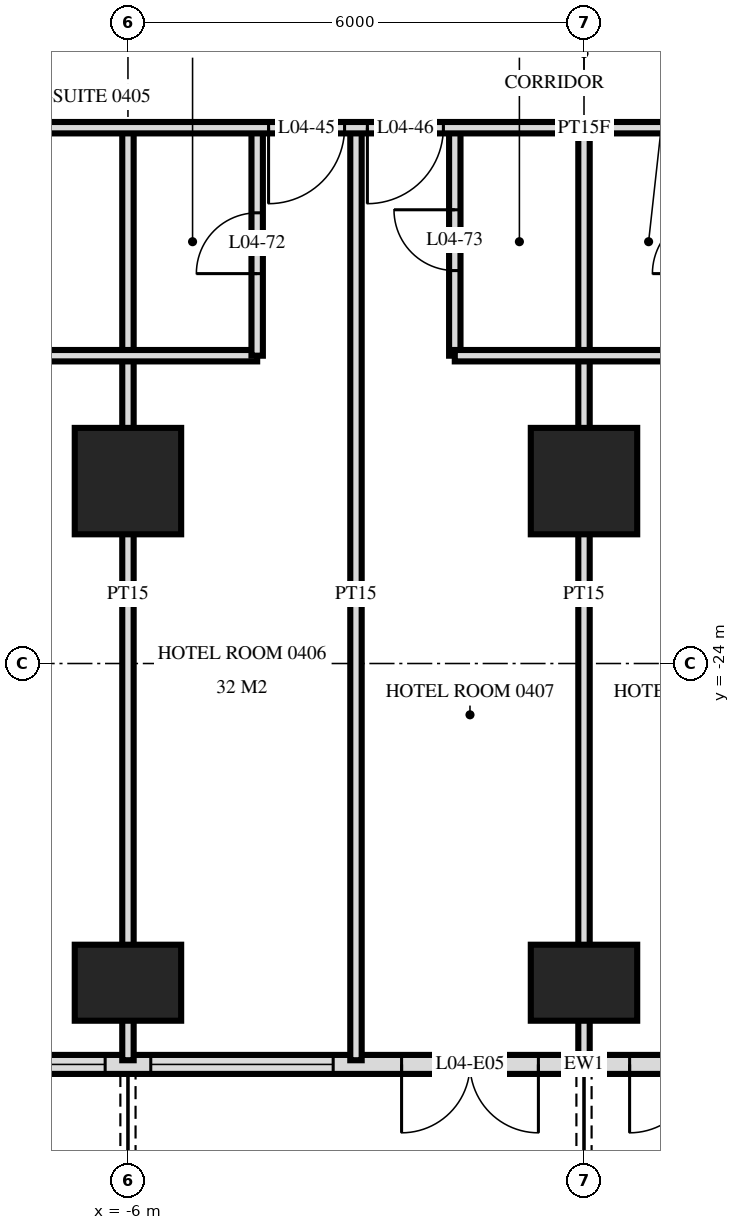
"""IFC4 building model, lengths in metres.
Left out: names, types, materials, properties, quantities, classifications, styles, units other than length and angle.
Written with IfcOpenShell. Run it as: python <this file> out.ifc"""

import sys

from ifc_helpers import new_model, si_unit, direction, frame, frame_2d, origin, origin_2d, place, context, subcontext, project, spatial, rectangle, extrude, element, fill, save


model = new_model("IFC4")
c1 = context("Model", 3, precision=1e-05, world=origin(), true_north=direction((0.0, 1.0)))
c2 = subcontext(c1, "Body", "Model", "MODEL_VIEW")
j1 = project(units=[si_unit("LENGTHUNIT", "METRE"), si_unit("PLANEANGLEUNIT", "RADIAN")], contexts=[c1])
p1 = place(None, origin())
s1 = spatial("IfcSite", under=j1, at=p1, CompositionType="ELEMENT")
p2 = place(p1, origin())
s2 = spatial("IfcBuilding", under=s1, at=p2, CompositionType="ELEMENT")
p3 = place(p2, frame((0.0, 0.0, 24.0)))
s3 = spatial("IfcBuildingStorey", under=s2, at=p3, CompositionType="ELEMENT", Elevation=24.0)
p4 = place(p3, frame((-6.0, -28.2, -0.28), z_axis=(0.0, 0.0, 1.0), x_axis=(1.0, 0.0, 0.0)))
e1 = element("IfcColumn", 1, at=p4, inside=s3, PredefinedType="COLUMN", context=c2, shape_type="SweptSolid", body=[
    extrude(rectangle(XDim=1.4, YDim=1.0, at=origin_2d()), origin(), (0.0, 0.0, 1.0), 3.88),
])
p5 = place(p3, frame((-6.0, -21.6, -0.28), z_axis=(0.0, 0.0, 1.0), x_axis=(1.0, 0.0, 0.0)))
e2 = element("IfcColumn", 2, at=p5, inside=s3, PredefinedType="COLUMN", context=c2, shape_type="SweptSolid", body=[
    extrude(rectangle(XDim=1.4, YDim=1.4, at=origin_2d()), origin(), (0.0, 0.0, 1.0), 3.88),
])
p6 = place(p3, frame((0.0, -28.2, -0.28), z_axis=(0.0, 0.0, 1.0), x_axis=(1.0, 0.0, 0.0)))
e3 = element("IfcColumn", 3, at=p6, inside=s3, PredefinedType="COLUMN", context=c2, shape_type="SweptSolid", body=[
    extrude(rectangle(XDim=1.4, YDim=1.0, at=origin_2d()), origin(), (0.0, 0.0, 1.0), 3.88),
])
p7 = place(p3, frame((0.0, -21.6, -0.28), z_axis=(0.0, 0.0, 1.0), x_axis=(1.0, 0.0, 0.0)))
e4 = element("IfcColumn", 4, at=p7, inside=s3, PredefinedType="COLUMN", context=c2, shape_type="SweptSolid", body=[
    extrude(rectangle(XDim=1.4, YDim=1.4, at=origin_2d()), origin(), (0.0, 0.0, 1.0), 3.88),
])
p8 = place(p3, frame((-28.775, -29.275, 0.0), z_axis=(0.0, 0.0, 1.0), x_axis=(1.0, 0.0, 0.0)))
e5 = element("IfcWall", 5, at=p8, inside=s3, PredefinedType="SOLIDWALL", context=c2, shape_type="SweptSolid", body=[
    extrude(rectangle(XDim=57.551, YDim=0.25, at=frame_2d((28.775, 0.0))), origin(), (0.0, 0.0, 1.0), 3.32),
])
p9 = place(p8, frame((0.575, 0.0, 0.0)))
e6 = element("IfcOpeningElement", 6, at=p9, cuts=e5, PredefinedType="OPENING", context=c2, shape_type="SweptSolid", body=[
    extrude(rectangle(XDim=1.8, YDim=2.4, at=frame_2d((0.9, 1.2))), frame((0.0, 0.135, 0.0), z_axis=(0.0, -1.0, 0.0), x_axis=(1.0, 0.0, 0.0)), (0.0, 0.0, 1.0), 0.27),
])
p10 = place(p8, frame((5.375, 0.0, 0.0)))
e7 = element("IfcOpeningElement", 7, at=p10, cuts=e5, PredefinedType="OPENING", context=c2, shape_type="SweptSolid", body=[
    extrude(rectangle(XDim=1.8, YDim=2.4, at=frame_2d((0.9, 1.2))), frame((0.0, 0.135, 0.0), z_axis=(0.0, -1.0, 0.0), x_axis=(1.0, 0.0, 0.0)), (0.0, 0.0, 1.0), 0.27),
])
p11 = place(p8, frame((8.075, 0.0, 0.3)))
e8 = element("IfcOpeningElement", 8, at=p11, cuts=e5, PredefinedType="OPENING", context=c2, shape_type="SweptSolid", body=[
    extrude(rectangle(XDim=2.4, YDim=2.1, at=frame_2d((1.2, 1.05))), frame((0.0, 0.135, 0.0), z_axis=(0.0, -1.0, 0.0), x_axis=(1.0, 0.0, 0.0)), (0.0, 0.0, 1.0), 0.27),
])
p12 = place(p8, frame((11.375, 0.0, 0.0)))
e9 = element("IfcOpeningElement", 9, at=p12, cuts=e5, PredefinedType="OPENING", context=c2, shape_type="SweptSolid", body=[
    extrude(rectangle(XDim=1.8, YDim=2.4, at=frame_2d((0.9, 1.2))), frame((0.0, 0.135, 0.0), z_axis=(0.0, -1.0, 0.0), x_axis=(1.0, 0.0, 0.0)), (0.0, 0.0, 1.0), 0.27),
])
p13 = place(p8, frame((14.075, 0.0, 0.3)))
e10 = element("IfcOpeningElement", 10, at=p13, cuts=e5, PredefinedType="OPENING", context=c2, shape_type="SweptSolid", body=[
    extrude(rectangle(XDim=2.4, YDim=2.1, at=frame_2d((1.2, 1.05))), frame((0.0, 0.135, 0.0), z_axis=(0.0, -1.0, 0.0), x_axis=(1.0, 0.0, 0.0)), (0.0, 0.0, 1.0), 0.27),
])
p14 = place(p8, frame((17.375, 0.0, 0.0)))
e11 = element("IfcOpeningElement", 11, at=p14, cuts=e5, PredefinedType="OPENING", context=c2, shape_type="SweptSolid", body=[
    extrude(rectangle(XDim=1.8, YDim=2.4, at=frame_2d((0.9, 1.2))), frame((0.0, 0.135, 0.0), z_axis=(0.0, -1.0, 0.0), x_axis=(1.0, 0.0, 0.0)), (0.0, 0.0, 1.0), 0.27),
])
p15 = place(p8, frame((20.075, 0.0, 0.3)))
e12 = element("IfcOpeningElement", 12, at=p15, cuts=e5, PredefinedType="OPENING", context=c2, shape_type="SweptSolid", body=[
    extrude(rectangle(XDim=2.4, YDim=2.1, at=frame_2d((1.2, 1.05))), frame((0.0, 0.135, 0.0), z_axis=(0.0, -1.0, 0.0), x_axis=(1.0, 0.0, 0.0)), (0.0, 0.0, 1.0), 0.27),
])
p16 = place(p8, frame((23.075, 0.0, 0.3)))
e13 = element("IfcOpeningElement", 13, at=p16, cuts=e5, PredefinedType="OPENING", context=c2, shape_type="SweptSolid", body=[
    extrude(rectangle(XDim=2.4, YDim=2.1, at=frame_2d((1.2, 1.05))), frame((0.0, 0.135, 0.0), z_axis=(0.0, -1.0, 0.0), x_axis=(1.0, 0.0, 0.0)), (0.0, 0.0, 1.0), 0.27),
])
p17 = place(p8, frame((26.375, 0.0, 0.0)))
e14 = element("IfcOpeningElement", 14, at=p17, cuts=e5, PredefinedType="OPENING", context=c2, shape_type="SweptSolid", body=[
    extrude(rectangle(XDim=1.8, YDim=2.4, at=frame_2d((0.9, 1.2))), frame((0.0, 0.135, 0.0), z_axis=(0.0, -1.0, 0.0), x_axis=(1.0, 0.0, 0.0)), (0.0, 0.0, 1.0), 0.27),
])
p18 = place(p8, frame((29.375, 0.0, 0.0)))
e15 = element("IfcOpeningElement", 15, at=p18, cuts=e5, PredefinedType="OPENING", context=c2, shape_type="SweptSolid", body=[
    extrude(rectangle(XDim=1.8, YDim=2.4, at=frame_2d((0.9, 1.2))), frame((0.0, 0.135, 0.0), z_axis=(0.0, -1.0, 0.0), x_axis=(1.0, 0.0, 0.0)), (0.0, 0.0, 1.0), 0.27),
])
p19 = place(p8, frame((32.075, 0.0, 0.3)))
e16 = element("IfcOpeningElement", 16, at=p19, cuts=e5, PredefinedType="OPENING", context=c2, shape_type="SweptSolid", body=[
    extrude(rectangle(XDim=2.4, YDim=2.1, at=frame_2d((1.2, 1.05))), frame((0.0, 0.135, 0.0), z_axis=(0.0, -1.0, 0.0), x_axis=(1.0, 0.0, 0.0)), (0.0, 0.0, 1.0), 0.27),
])
p20 = place(p8, frame((35.375, 0.0, 0.0)))
e17 = element("IfcOpeningElement", 17, at=p20, cuts=e5, PredefinedType="OPENING", context=c2, shape_type="SweptSolid", body=[
    extrude(rectangle(XDim=1.8, YDim=2.4, at=frame_2d((0.9, 1.2))), frame((0.0, 0.135, 0.0), z_axis=(0.0, -1.0, 0.0), x_axis=(1.0, 0.0, 0.0)), (0.0, 0.0, 1.0), 0.27),
])
p21 = place(p8, frame((38.075, 0.0, 0.3)))
e18 = element("IfcOpeningElement", 18, at=p21, cuts=e5, PredefinedType="OPENING", context=c2, shape_type="SweptSolid", body=[
    extrude(rectangle(XDim=2.4, YDim=2.1, at=frame_2d((1.2, 1.05))), frame((0.0, 0.135, 0.0), z_axis=(0.0, -1.0, 0.0), x_axis=(1.0, 0.0, 0.0)), (0.0, 0.0, 1.0), 0.27),
])
p22 = place(p8, frame((41.375, 0.0, 0.0)))
e19 = element("IfcOpeningElement", 19, at=p22, cuts=e5, PredefinedType="OPENING", context=c2, shape_type="SweptSolid", body=[
    extrude(rectangle(XDim=1.8, YDim=2.4, at=frame_2d((0.9, 1.2))), frame((0.0, 0.135, 0.0), z_axis=(0.0, -1.0, 0.0), x_axis=(1.0, 0.0, 0.0)), (0.0, 0.0, 1.0), 0.27),
])
p23 = place(p8, frame((44.075, 0.0, 0.3)))
e20 = element("IfcOpeningElement", 20, at=p23, cuts=e5, PredefinedType="OPENING", context=c2, shape_type="SweptSolid", body=[
    extrude(rectangle(XDim=2.4, YDim=2.1, at=frame_2d((1.2, 1.05))), frame((0.0, 0.135, 0.0), z_axis=(0.0, -1.0, 0.0), x_axis=(1.0, 0.0, 0.0)), (0.0, 0.0, 1.0), 0.27),
])
p24 = place(p8, frame((47.075, 0.0, 0.3)))
e21 = element("IfcOpeningElement", 21, at=p24, cuts=e5, PredefinedType="OPENING", context=c2, shape_type="SweptSolid", body=[
    extrude(rectangle(XDim=2.4, YDim=2.1, at=frame_2d((1.2, 1.05))), frame((0.0, 0.135, 0.0), z_axis=(0.0, -1.0, 0.0), x_axis=(1.0, 0.0, 0.0)), (0.0, 0.0, 1.0), 0.27),
])
p25 = place(p8, frame((50.375, 0.0, 0.0)))
e22 = element("IfcOpeningElement", 22, at=p25, cuts=e5, PredefinedType="OPENING", context=c2, shape_type="SweptSolid", body=[
    extrude(rectangle(XDim=1.8, YDim=2.4, at=frame_2d((0.9, 1.2))), frame((0.0, 0.135, 0.0), z_axis=(0.0, -1.0, 0.0), x_axis=(1.0, 0.0, 0.0)), (0.0, 0.0, 1.0), 0.27),
])
p26 = place(p8, frame((53.375, 0.0, 0.0)))
e23 = element("IfcOpeningElement", 23, at=p26, cuts=e5, PredefinedType="OPENING", context=c2, shape_type="SweptSolid", body=[
    extrude(rectangle(XDim=1.8, YDim=2.4, at=frame_2d((0.9, 1.2))), frame((0.0, 0.135, 0.0), z_axis=(0.0, -1.0, 0.0), x_axis=(1.0, 0.0, 0.0)), (0.0, 0.0, 1.0), 0.27),
])
p27 = place(p3, frame((0.0, -29.22, 0.0), z_axis=(0.0, 0.0, 1.0), x_axis=(0.0, 1.0, 0.0)))
e24 = element("IfcWall", 24, at=p27, inside=s3, PredefinedType="PARTITIONING", context=c2, shape_type="SweptSolid", body=[
    extrude(rectangle(XDim=12.27, YDim=0.15, at=frame_2d((6.135, 0.0))), origin(), (0.0, 0.0, 1.0), 3.32),
])
p28 = place(p3, frame((-1.7, -19.95, 0.0), z_axis=(0.0, 0.0, 1.0), x_axis=(0.0, 1.0, 0.0)))
e25 = element("IfcWall", 25, at=p28, inside=s3, PredefinedType="PARTITIONING", context=c2, shape_type="SweptSolid", body=[
    extrude(rectangle(XDim=3.0, YDim=0.15, at=frame_2d((1.5, 0.0))), origin(), (0.0, 0.0, 1.0), 3.32),
])
p29 = place(p28, frame((1.12, 0.0, 0.0)))
e26 = element("IfcOpeningElement", 26, at=p29, cuts=e25, PredefinedType="OPENING", context=c2, shape_type="SweptSolid", body=[
    extrude(rectangle(XDim=0.8, YDim=2.1, at=frame_2d((0.4, 1.05))), frame((0.0, 0.085, 0.0), z_axis=(0.0, -1.0, 0.0), x_axis=(1.0, 0.0, 0.0)), (0.0, 0.0, 1.0), 0.17),
])
p30 = place(p3, frame((-3.0, -29.22, 0.0), z_axis=(0.0, 0.0, 1.0), x_axis=(0.0, 1.0, 0.0)))
e27 = element("IfcWall", 27, at=p30, inside=s3, PredefinedType="PARTITIONING", context=c2, shape_type="SweptSolid", body=[
    extrude(rectangle(XDim=12.27, YDim=0.15, at=frame_2d((6.135, 0.0))), origin(), (0.0, 0.0, 1.0), 3.32),
])
p31 = place(p3, frame((-4.3, -19.95, 0.0), z_axis=(0.0, 0.0, 1.0), x_axis=(0.0, 1.0, 0.0)))
e28 = element("IfcWall", 28, at=p31, inside=s3, PredefinedType="PARTITIONING", context=c2, shape_type="SweptSolid", body=[
    extrude(rectangle(XDim=3.0, YDim=0.15, at=frame_2d((1.5, 0.0))), origin(), (0.0, 0.0, 1.0), 3.32),
])
p32 = place(p31, frame((1.08, 0.0, 0.0)))
e29 = element("IfcOpeningElement", 29, at=p32, cuts=e28, PredefinedType="OPENING", context=c2, shape_type="SweptSolid", body=[
    extrude(rectangle(XDim=0.8, YDim=2.1, at=frame_2d((0.4, 1.05))), frame((0.0, 0.085, 0.0), z_axis=(0.0, -1.0, 0.0), x_axis=(1.0, 0.0, 0.0)), (0.0, 0.0, 1.0), 0.17),
])
p33 = place(p3, frame((-6.0, -29.22, 0.0), z_axis=(0.0, 0.0, 1.0), x_axis=(0.0, 1.0, 0.0)))
e30 = element("IfcWall", 30, at=p33, inside=s3, PredefinedType="PARTITIONING", context=c2, shape_type="SweptSolid", body=[
    extrude(rectangle(XDim=12.27, YDim=0.15, at=frame_2d((6.135, 0.0))), origin(), (0.0, 0.0, 1.0), 3.32),
])
p34 = place(p3, frame((-8.7, -19.95, 0.0), z_axis=(0.0, 0.0, 1.0), x_axis=(1.0, 0.0, 0.0)))
e31 = element("IfcWall", 31, at=p34, inside=s3, PredefinedType="PARTITIONING", context=c2, shape_type="SweptSolid", body=[
    extrude(rectangle(XDim=4.4, YDim=0.15, at=frame_2d((2.2, 0.0))), origin(), (0.0, 0.0, 1.0), 3.32),
])
p35 = place(p3, frame((-1.7, -19.95, 0.0), z_axis=(0.0, 0.0, 1.0), x_axis=(1.0, 0.0, 0.0)))
e32 = element("IfcWall", 32, at=p35, inside=s3, PredefinedType="PARTITIONING", context=c2, shape_type="SweptSolid", body=[
    extrude(rectangle(XDim=3.4, YDim=0.15, at=frame_2d((1.7, 0.0))), origin(), (0.0, 0.0, 1.0), 3.32),
])
p36 = place(p3, frame((-33.12, -16.95, 0.0), z_axis=(0.0, 0.0, 1.0), x_axis=(1.0, 0.0, 0.0)))
e33 = element("IfcWall", 33, at=p36, inside=s3, PredefinedType="PARTITIONING", context=c2, shape_type="SweptSolid", body=[
    extrude(rectangle(XDim=66.24, YDim=0.15, at=frame_2d((33.12, 0.0))), origin(), (0.0, 0.0, 1.0), 3.32),
])
p37 = place(p36, frame((9.27, 0.0, 0.0)))
e34 = element("IfcOpeningElement", 34, at=p37, cuts=e33, PredefinedType="OPENING", context=c2, shape_type="SweptSolid", body=[
    extrude(rectangle(XDim=1.0, YDim=2.1, at=frame_2d((0.5, 1.05))), frame((0.0, 0.085, 0.0), z_axis=(0.0, -1.0, 0.0), x_axis=(1.0, 0.0, 0.0)), (0.0, 0.0, 1.0), 0.17),
])
p38 = place(p36, frame((13.97, 0.0, 0.0)))
e35 = element("IfcOpeningElement", 35, at=p38, cuts=e33, PredefinedType="OPENING", context=c2, shape_type="SweptSolid", body=[
    extrude(rectangle(XDim=1.0, YDim=2.1, at=frame_2d((0.5, 1.05))), frame((0.0, 0.085, 0.0), z_axis=(0.0, -1.0, 0.0), x_axis=(1.0, 0.0, 0.0)), (0.0, 0.0, 1.0), 0.17),
])
p39 = place(p36, frame((15.27, 0.0, 0.0)))
e36 = element("IfcOpeningElement", 36, at=p39, cuts=e33, PredefinedType="OPENING", context=c2, shape_type="SweptSolid", body=[
    extrude(rectangle(XDim=1.0, YDim=2.1, at=frame_2d((0.5, 1.05))), frame((0.0, 0.085, 0.0), z_axis=(0.0, -1.0, 0.0), x_axis=(1.0, 0.0, 0.0)), (0.0, 0.0, 1.0), 0.17),
])
p40 = place(p36, frame((19.97, 0.0, 0.0)))
e37 = element("IfcOpeningElement", 37, at=p40, cuts=e33, PredefinedType="OPENING", context=c2, shape_type="SweptSolid", body=[
    extrude(rectangle(XDim=1.0, YDim=2.1, at=frame_2d((0.5, 1.05))), frame((0.0, 0.085, 0.0), z_axis=(0.0, -1.0, 0.0), x_axis=(1.0, 0.0, 0.0)), (0.0, 0.0, 1.0), 0.17),
])
p41 = place(p36, frame((22.27, 0.0, 0.0)))
e38 = element("IfcOpeningElement", 38, at=p41, cuts=e33, PredefinedType="OPENING", context=c2, shape_type="SweptSolid", body=[
    extrude(rectangle(XDim=1.0, YDim=2.1, at=frame_2d((0.5, 1.05))), frame((0.0, 0.085, 0.0), z_axis=(0.0, -1.0, 0.0), x_axis=(1.0, 0.0, 0.0)), (0.0, 0.0, 1.0), 0.17),
])
p42 = place(p36, frame((28.97, 0.0, 0.0)))
e39 = element("IfcOpeningElement", 39, at=p42, cuts=e33, PredefinedType="OPENING", context=c2, shape_type="SweptSolid", body=[
    extrude(rectangle(XDim=1.0, YDim=2.1, at=frame_2d((0.5, 1.05))), frame((0.0, 0.085, 0.0), z_axis=(0.0, -1.0, 0.0), x_axis=(1.0, 0.0, 0.0)), (0.0, 0.0, 1.0), 0.17),
])
p43 = place(p36, frame((30.27, 0.0, 0.0)))
e40 = element("IfcOpeningElement", 40, at=p43, cuts=e33, PredefinedType="OPENING", context=c2, shape_type="SweptSolid", body=[
    extrude(rectangle(XDim=1.0, YDim=2.1, at=frame_2d((0.5, 1.05))), frame((0.0, 0.085, 0.0), z_axis=(0.0, -1.0, 0.0), x_axis=(1.0, 0.0, 0.0)), (0.0, 0.0, 1.0), 0.17),
])
p44 = place(p36, frame((34.97, 0.0, 0.0)))
e41 = element("IfcOpeningElement", 41, at=p44, cuts=e33, PredefinedType="OPENING", context=c2, shape_type="SweptSolid", body=[
    extrude(rectangle(XDim=1.0, YDim=2.1, at=frame_2d((0.5, 1.05))), frame((0.0, 0.085, 0.0), z_axis=(0.0, -1.0, 0.0), x_axis=(1.0, 0.0, 0.0)), (0.0, 0.0, 1.0), 0.17),
])
p45 = place(p36, frame((36.27, 0.0, 0.0)))
e42 = element("IfcOpeningElement", 42, at=p45, cuts=e33, PredefinedType="OPENING", context=c2, shape_type="SweptSolid", body=[
    extrude(rectangle(XDim=1.0, YDim=2.1, at=frame_2d((0.5, 1.05))), frame((0.0, 0.085, 0.0), z_axis=(0.0, -1.0, 0.0), x_axis=(1.0, 0.0, 0.0)), (0.0, 0.0, 1.0), 0.17),
])
p46 = place(p36, frame((40.97, 0.0, 0.0)))
e43 = element("IfcOpeningElement", 43, at=p46, cuts=e33, PredefinedType="OPENING", context=c2, shape_type="SweptSolid", body=[
    extrude(rectangle(XDim=1.0, YDim=2.1, at=frame_2d((0.5, 1.05))), frame((0.0, 0.085, 0.0), z_axis=(0.0, -1.0, 0.0), x_axis=(1.0, 0.0, 0.0)), (0.0, 0.0, 1.0), 0.17),
])
p47 = place(p36, frame((42.27, 0.0, 0.0)))
e44 = element("IfcOpeningElement", 44, at=p47, cuts=e33, PredefinedType="OPENING", context=c2, shape_type="SweptSolid", body=[
    extrude(rectangle(XDim=1.0, YDim=2.1, at=frame_2d((0.5, 1.05))), frame((0.0, 0.085, 0.0), z_axis=(0.0, -1.0, 0.0), x_axis=(1.0, 0.0, 0.0)), (0.0, 0.0, 1.0), 0.17),
])
p48 = place(p36, frame((46.97, 0.0, 0.0)))
e45 = element("IfcOpeningElement", 45, at=p48, cuts=e33, PredefinedType="OPENING", context=c2, shape_type="SweptSolid", body=[
    extrude(rectangle(XDim=1.0, YDim=2.1, at=frame_2d((0.5, 1.05))), frame((0.0, 0.085, 0.0), z_axis=(0.0, -1.0, 0.0), x_axis=(1.0, 0.0, 0.0)), (0.0, 0.0, 1.0), 0.17),
])
p49 = place(p36, frame((48.27, 0.0, 0.0)))
e46 = element("IfcOpeningElement", 46, at=p49, cuts=e33, PredefinedType="OPENING", context=c2, shape_type="SweptSolid", body=[
    extrude(rectangle(XDim=1.0, YDim=2.1, at=frame_2d((0.5, 1.05))), frame((0.0, 0.085, 0.0), z_axis=(0.0, -1.0, 0.0), x_axis=(1.0, 0.0, 0.0)), (0.0, 0.0, 1.0), 0.17),
])
p50 = place(p36, frame((52.97, 0.0, 0.0)))
e47 = element("IfcOpeningElement", 47, at=p50, cuts=e33, PredefinedType="OPENING", context=c2, shape_type="SweptSolid", body=[
    extrude(rectangle(XDim=1.0, YDim=2.1, at=frame_2d((0.5, 1.05))), frame((0.0, 0.085, 0.0), z_axis=(0.0, -1.0, 0.0), x_axis=(1.0, 0.0, 0.0)), (0.0, 0.0, 1.0), 0.17),
])
p51 = place(p36, frame((54.27, 0.0, 0.0)))
e48 = element("IfcOpeningElement", 48, at=p51, cuts=e33, PredefinedType="OPENING", context=c2, shape_type="SweptSolid", body=[
    extrude(rectangle(XDim=1.0, YDim=2.1, at=frame_2d((0.5, 1.05))), frame((0.0, 0.085, 0.0), z_axis=(0.0, -1.0, 0.0), x_axis=(1.0, 0.0, 0.0)), (0.0, 0.0, 1.0), 0.17),
])
p52 = place(p36, frame((4.4, 0.0, 0.0)))
e49 = element("IfcOpeningElement", 49, at=p52, cuts=e33, PredefinedType="OPENING", context=c2, shape_type="SweptSolid", body=[
    extrude(rectangle(XDim=1.0, YDim=2.1, at=frame_2d((0.5, 1.05))), frame((0.0, 0.085, 0.0), z_axis=(0.0, -1.0, 0.0), x_axis=(1.0, 0.0, 0.0)), (0.0, 0.0, 1.0), 0.17),
])
p53 = place(p36, frame((60.8, 0.0, 0.0)))
e50 = element("IfcOpeningElement", 50, at=p53, cuts=e33, PredefinedType="OPENING", context=c2, shape_type="SweptSolid", body=[
    extrude(rectangle(XDim=1.0, YDim=2.1, at=frame_2d((0.5, 1.05))), frame((0.0, 0.085, 0.0), z_axis=(0.0, -1.0, 0.0), x_axis=(1.0, 0.0, 0.0)), (0.0, 0.0, 1.0), 0.17),
])
p54 = place(p15, origin())
e51 = element("IfcWindow", 51, at=p54, inside=s3, PartitioningType="SINGLE_PANEL", PredefinedType="WINDOW", context=c2, shape_type="SweptSolid", body=[
    extrude(rectangle(XDim=2.4, YDim=2.1, at=frame_2d((1.2, 1.05))), frame((0.0, 0.03, 0.0), z_axis=(0.0, -1.0, 0.0), x_axis=(1.0, 0.0, 0.0)), (0.0, 0.0, 1.0), 0.06),
])
fill(e12, e51)
p55 = place(p16, origin())
e52 = element("IfcWindow", 52, at=p55, inside=s3, PartitioningType="SINGLE_PANEL", PredefinedType="WINDOW", context=c2, shape_type="SweptSolid", body=[
    extrude(rectangle(XDim=2.4, YDim=2.1, at=frame_2d((1.2, 1.05))), frame((0.0, 0.03, 0.0), z_axis=(0.0, -1.0, 0.0), x_axis=(1.0, 0.0, 0.0)), (0.0, 0.0, 1.0), 0.06),
])
fill(e13, e52)
p56 = place(p17, frame((0.9, 0.0, 0.0), z_axis=(0.0, 0.0, 1.0), x_axis=(-1.0, 0.0, 0.0)))
e53 = element("IfcDoor", 53, at=p56, inside=s3, OperationType="DOUBLE_DOOR_SINGLE_SWING", PredefinedType="DOOR", context=c2, shape_type="SweptSolid", body=[
    extrude(rectangle(XDim=1.8, YDim=2.4, at=frame_2d((0.0, 1.2))), frame((0.0, -0.025, 0.0), z_axis=(0.0, 1.0, 0.0), x_axis=(-1.0, 0.0, 0.0)), (0.0, 0.0, 1.0), 0.05),
])
fill(e14, e53)
p57 = place(p18, frame((0.9, 0.0, 0.0), z_axis=(0.0, 0.0, 1.0), x_axis=(-1.0, 0.0, 0.0)))
e54 = element("IfcDoor", 54, at=p57, inside=s3, OperationType="DOUBLE_DOOR_SINGLE_SWING", PredefinedType="DOOR", context=c2, shape_type="SweptSolid", body=[
    extrude(rectangle(XDim=1.8, YDim=2.4, at=frame_2d((0.0, 1.2))), frame((0.0, -0.025, 0.0), z_axis=(0.0, 1.0, 0.0), x_axis=(-1.0, 0.0, 0.0)), (0.0, 0.0, 1.0), 0.05),
])
fill(e15, e54)
p58 = place(p42, frame((0.5, 0.0, 0.0), z_axis=(0.0, 0.0, 1.0), x_axis=(-1.0, 0.0, 0.0)))
e55 = element("IfcDoor", 55, at=p58, inside=s3, OperationType="SINGLE_SWING_LEFT", PredefinedType="DOOR", context=c2, shape_type="SweptSolid", body=[
    extrude(rectangle(XDim=1.0, YDim=2.1, at=frame_2d((0.0, 1.05))), frame((0.0, -0.025, 0.0), z_axis=(0.0, 1.0, 0.0), x_axis=(-1.0, 0.0, 0.0)), (0.0, 0.0, 1.0), 0.05),
])
fill(e39, e55)
p59 = place(p43, frame((0.5, 0.0, 0.0), z_axis=(0.0, 0.0, 1.0), x_axis=(-1.0, 0.0, 0.0)))
e56 = element("IfcDoor", 56, at=p59, inside=s3, OperationType="SINGLE_SWING_LEFT", PredefinedType="DOOR", context=c2, shape_type="SweptSolid", body=[
    extrude(rectangle(XDim=1.0, YDim=2.1, at=frame_2d((0.0, 1.05))), frame((0.0, -0.025, 0.0), z_axis=(0.0, 1.0, 0.0), x_axis=(-1.0, 0.0, 0.0)), (0.0, 0.0, 1.0), 0.05),
])
fill(e40, e56)
p60 = place(p32, origin())
e57 = element("IfcDoor", 57, at=p60, inside=s3, OperationType="SINGLE_SWING_RIGHT", PredefinedType="DOOR", context=c2, shape_type="SweptSolid", body=[
    extrude(rectangle(XDim=0.8, YDim=2.1, at=frame_2d((0.4, 1.05))), frame((0.0, 0.025, 0.0), z_axis=(0.0, -1.0, 0.0), x_axis=(1.0, 0.0, 0.0)), (0.0, 0.0, 1.0), 0.05),
])
fill(e29, e57)
p61 = place(p29, origin())
e58 = element("IfcDoor", 58, at=p61, inside=s3, OperationType="SINGLE_SWING_LEFT", PredefinedType="DOOR", context=c2, shape_type="SweptSolid", body=[
    extrude(rectangle(XDim=0.8, YDim=2.1, at=frame_2d((0.4, 1.05))), frame((0.0, 0.025, 0.0), z_axis=(0.0, -1.0, 0.0), x_axis=(1.0, 0.0, 0.0)), (0.0, 0.0, 1.0), 0.05),
])
fill(e26, e58)
save(model, sys.argv[1])
